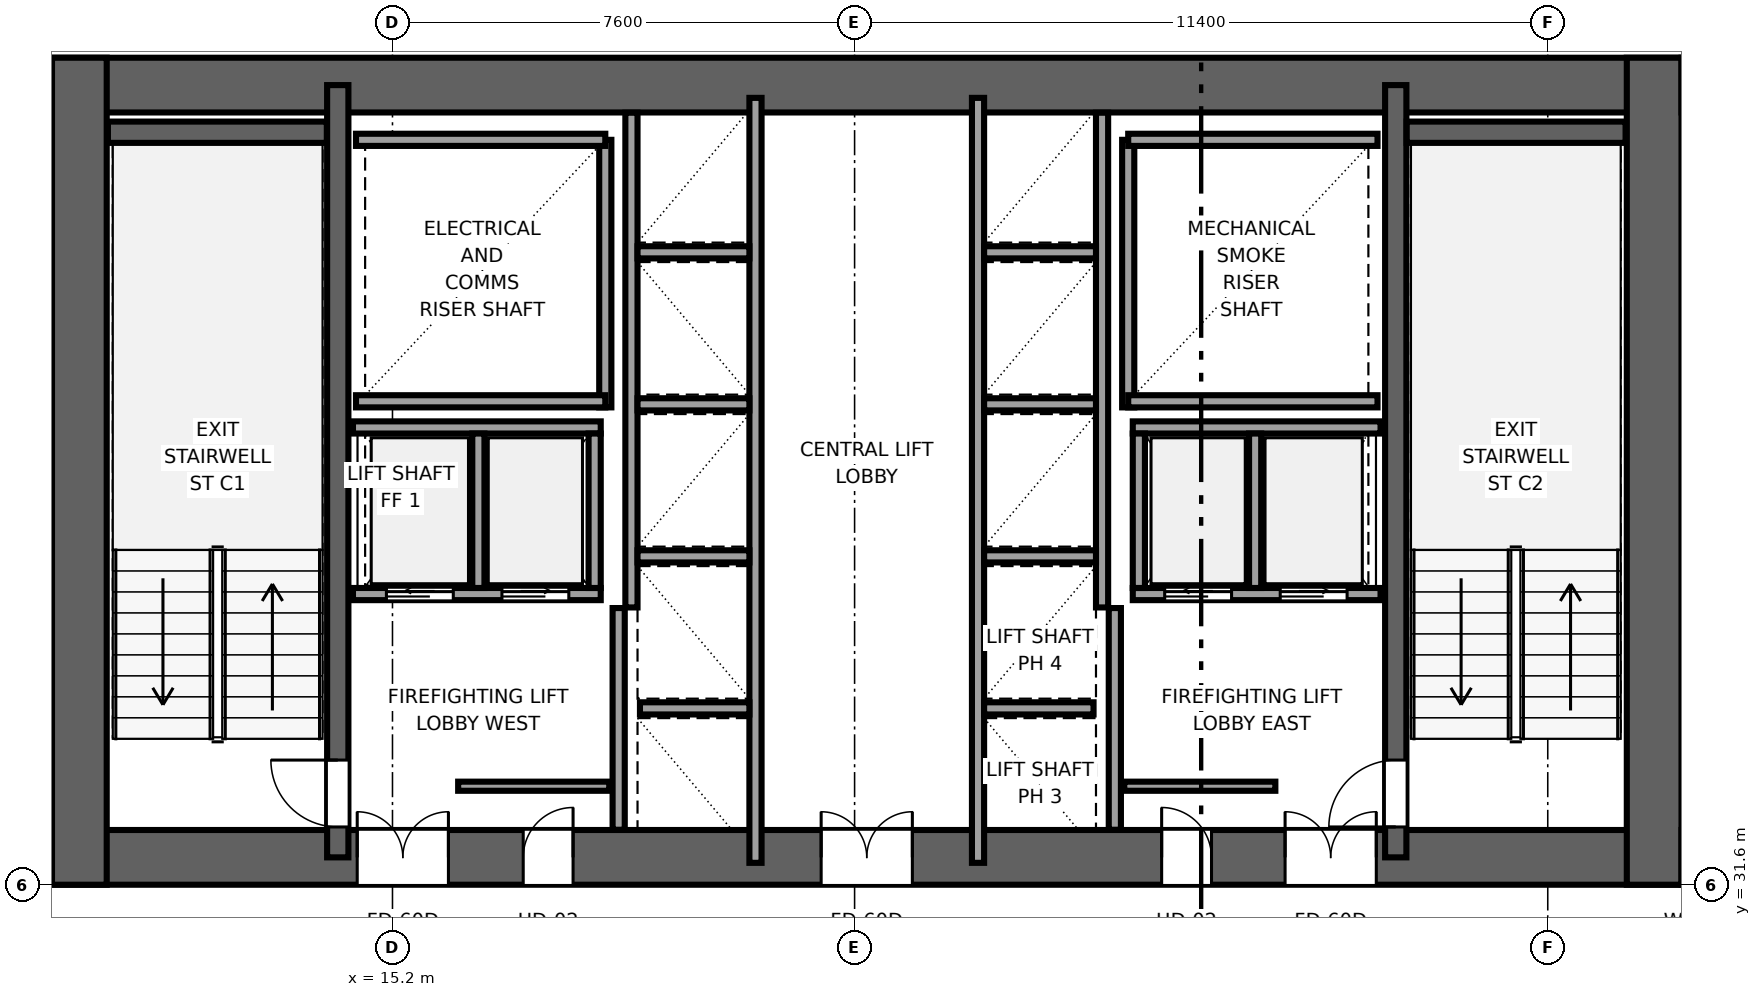
"""IFC4 building model, lengths in metres.
Left out: names, types, materials, properties, quantities, classifications, styles, units other than length and angle.
Written with IfcOpenShell. Run it as: python <this file> out.ifc"""

import sys

from ifc_helpers import new_model, si_unit, direction, frame, frame_2d, origin, place, context, subcontext, project, spatial, rectangle, extrude, source, transform, mapped, element, fill, save


model = new_model("IFC4")
c1 = context("Model", 3, precision=1e-05, world=origin(), true_north=direction((0.0, 1.0)))
c2 = subcontext(c1, "Body", "Model", "MODEL_VIEW")
j1 = project(units=[si_unit("LENGTHUNIT", "METRE"), si_unit("PLANEANGLEUNIT", "RADIAN")], contexts=[c1])
p1 = place(None, origin())
s1 = spatial("IfcSite", under=j1, at=p1, CompositionType="ELEMENT")
p2 = place(p1, origin())
s2 = spatial("IfcBuilding", under=s1, at=p2, CompositionType="ELEMENT")
p3 = place(p2, frame((0.0, 0.0, 81.7)))
s3 = spatial("IfcBuildingStorey", under=s2, at=p3, CompositionType="ELEMENT", Elevation=81.7)
p4 = place(p3, frame((9.6, 32.05, 0.0), z_axis=(0.0, 0.0, 1.0), x_axis=(1.0, 0.0, 0.0)))
e1 = element("IfcWall", 1, at=p4, inside=s3, PredefinedType="SHEAR", context=c2, shape_type="SweptSolid", body=[
    extrude(rectangle(XDim=26.8, YDim=0.9, at=frame_2d((13.4, 0.0))), origin(), (0.0, 0.0, 1.0), 3.55),
])
p5 = place(p4, frame((6.52, 0.0, 0.0), z_axis=(0.0, 0.0, 1.0), x_axis=(-1.0, 0.0, 0.0)))
e2 = element("IfcOpeningElement", 2, at=p5, cuts=e1, PredefinedType="OPENING", context=c2, shape_type="SweptSolid", body=[
    extrude(rectangle(XDim=1.5, YDim=2.04, at=frame_2d((0.75, 1.02))), frame((0.0, 0.46, 0.0), z_axis=(0.0, -1.0, 0.0), x_axis=(1.0, 0.0, 0.0)), (0.0, 0.0, 1.0), 0.92),
])
p6 = place(p4, frame((14.15, 0.0, 0.0), z_axis=(0.0, 0.0, 1.0), x_axis=(-1.0, 0.0, 0.0)))
e3 = element("IfcOpeningElement", 3, at=p6, cuts=e1, PredefinedType="OPENING", context=c2, shape_type="SweptSolid", body=[
    extrude(rectangle(XDim=1.5, YDim=2.04, at=frame_2d((0.75, 1.02))), frame((0.0, 0.46, 0.0), z_axis=(0.0, -1.0, 0.0), x_axis=(1.0, 0.0, 0.0)), (0.0, 0.0, 1.0), 0.92),
])
p7 = place(p4, frame((21.78, 0.0, 0.0), z_axis=(0.0, 0.0, 1.0), x_axis=(-1.0, 0.0, 0.0)))
e4 = element("IfcOpeningElement", 4, at=p7, cuts=e1, PredefinedType="OPENING", context=c2, shape_type="SweptSolid", body=[
    extrude(rectangle(XDim=1.5, YDim=2.04, at=frame_2d((0.75, 1.02))), frame((0.0, 0.46, 0.0), z_axis=(0.0, -1.0, 0.0), x_axis=(1.0, 0.0, 0.0)), (0.0, 0.0, 1.0), 0.92),
])
p8 = place(p4, frame((8.57, 0.0, 0.0), z_axis=(0.0, 0.0, 1.0), x_axis=(-1.0, 0.0, 0.0)))
e5 = element("IfcOpeningElement", 5, at=p8, cuts=e1, PredefinedType="OPENING", context=c2, shape_type="SweptSolid", body=[
    extrude(rectangle(XDim=0.82, YDim=2.01, at=frame_2d((0.41, 1.005))), frame((0.0, 0.46, 0.0), z_axis=(0.0, -1.0, 0.0), x_axis=(1.0, 0.0, 0.0)), (0.0, 0.0, 1.0), 0.92),
])
p9 = place(p4, frame((19.07, 0.0, 0.0), z_axis=(0.0, 0.0, 1.0), x_axis=(-1.0, 0.0, 0.0)))
e6 = element("IfcOpeningElement", 6, at=p9, cuts=e1, PredefinedType="OPENING", context=c2, shape_type="SweptSolid", body=[
    extrude(rectangle(XDim=0.82, YDim=2.01, at=frame_2d((0.41, 1.005))), frame((0.0, 0.46, 0.0), z_axis=(0.0, -1.0, 0.0), x_axis=(1.0, 0.0, 0.0)), (0.0, 0.0, 1.0), 0.92),
])
p10 = place(p3, frame((9.6, 44.75, 0.0), z_axis=(0.0, 0.0, 1.0), x_axis=(1.0, 0.0, 0.0)))
e7 = element("IfcWall", 7, at=p10, inside=s3, PredefinedType="SHEAR", context=c2, shape_type="SweptSolid", body=[
    extrude(rectangle(XDim=26.8, YDim=0.9, at=frame_2d((13.4, 0.0))), origin(), (0.0, 0.0, 1.0), 3.55),
])
for number, where, z_axis, x_axis in (
    (8, (10.05, 31.6, 0.0), (0.0, 0.0, 1.0), (0.0, 1.0, 0.0)),
    (9, (35.95, 31.6, 0.0), (0.0, 0.0, 1.0), (0.0, 1.0, 0.0)),
):
    element("IfcWall", number, at=place(p3, frame(where, z_axis=z_axis, x_axis=x_axis)), inside=s3, PredefinedType="SHEAR", context=c2, shape_type="SweptSolid", body=[
        extrude(rectangle(XDim=13.6, YDim=0.9, at=frame_2d((6.8, 0.0))), origin(), (0.0, 0.0, 1.0), 3.55),
    ])
p11 = place(p3, frame((14.3, 32.05, 0.0), z_axis=(0.0, 0.0, 1.0), x_axis=(0.0, 1.0, 0.0)))
e10 = element("IfcWall", 10, at=p11, inside=s3, PredefinedType="SHEAR", context=c2, shape_type="SweptSolid", body=[
    extrude(rectangle(XDim=12.7, YDim=0.35, at=frame_2d((6.35, 0.0))), origin(), (0.0, 0.0, 1.0), 3.55),
])
p12 = place(p11, frame((0.5, 0.0, 0.0)))
e11 = element("IfcOpeningElement", 11, at=p12, cuts=e10, PredefinedType="OPENING", context=c2, shape_type="SweptSolid", body=[
    extrude(rectangle(XDim=1.1, YDim=2.12, at=frame_2d((0.55, 1.06))), frame((0.0, 0.185, 0.0), z_axis=(0.0, -1.0, 0.0), x_axis=(1.0, 0.0, 0.0)), (0.0, 0.0, 1.0), 0.37),
])
p13 = place(p3, frame((31.7, 32.05, 0.0), z_axis=(0.0, 0.0, 1.0), x_axis=(0.0, 1.0, 0.0)))
e12 = element("IfcWall", 12, at=p13, inside=s3, PredefinedType="SHEAR", context=c2, shape_type="SweptSolid", body=[
    extrude(rectangle(XDim=12.7, YDim=0.35, at=frame_2d((6.35, 0.0))), origin(), (0.0, 0.0, 1.0), 3.55),
])
p14 = place(p13, frame((1.6, 0.0, 0.0), z_axis=(0.0, 0.0, 1.0), x_axis=(-1.0, 0.0, 0.0)))
e13 = element("IfcOpeningElement", 13, at=p14, cuts=e12, PredefinedType="OPENING", context=c2, shape_type="SweptSolid", body=[
    extrude(rectangle(XDim=1.1, YDim=2.12, at=frame_2d((0.55, 1.06))), frame((0.0, 0.185, 0.0), z_axis=(0.0, -1.0, 0.0), x_axis=(1.0, 0.0, 0.0)), (0.0, 0.0, 1.0), 0.37),
])
for number, where, z_axis, x_axis in (
    (14, (10.52, 43.975, 0.0), (0.0, 0.0, 1.0), (1.0, 0.0, 0.0)),
    (15, (31.88, 43.975, 0.0), (0.0, 0.0, 1.0), (1.0, 0.0, 0.0)),
):
    element("IfcWall", number, at=place(p3, frame(where, z_axis=z_axis, x_axis=x_axis)), inside=s3, PredefinedType="SHEAR", context=c2, shape_type="SweptSolid", body=[
        extrude(rectangle(XDim=3.6, YDim=0.35, at=frame_2d((1.8, 0.0))), origin(), (0.0, 0.0, 1.0), 3.55),
    ])
p15 = place(p3, frame((18.7, 39.45, 0.0), z_axis=(0.0, 0.0, 1.0), x_axis=(0.0, 1.0, 0.0)))
e16 = element("IfcWall", 16, at=p15, inside=s3, PredefinedType="SOLIDWALL", context=c2, shape_type="SweptSolid", body=[
    extrude(rectangle(XDim=4.4, YDim=0.2, at=frame_2d((2.2, 0.0))), origin(), (0.0, 0.0, 1.0), 3.37),
])
for number, where, z_axis, x_axis in (
    (17, (14.6, 39.55, 0.0), (0.0, 0.0, 1.0), (1.0, 0.0, 0.0)),
    (18, (14.6, 43.85, 0.0), (0.0, 0.0, 1.0), (1.0, 0.0, 0.0)),
):
    element("IfcWall", number, at=place(p3, frame(where, z_axis=z_axis, x_axis=x_axis)), inside=s3, PredefinedType="SOLIDWALL", context=c2, shape_type="SweptSolid", body=[
        extrude(rectangle(XDim=4.1, YDim=0.2, at=frame_2d((2.05, 0.0))), origin(), (0.0, 0.0, 1.0), 3.37),
    ])
p16 = place(p3, frame((27.3, 39.45, 0.0), z_axis=(0.0, 0.0, 1.0), x_axis=(0.0, 1.0, 0.0)))
e19 = element("IfcWall", 19, at=p16, inside=s3, PredefinedType="SOLIDWALL", context=c2, shape_type="SweptSolid", body=[
    extrude(rectangle(XDim=4.4, YDim=0.2, at=frame_2d((2.2, 0.0))), origin(), (0.0, 0.0, 1.0), 3.37),
])
for number, where, z_axis, x_axis in (
    (20, (27.3, 39.55, 0.0), (0.0, 0.0, 1.0), (1.0, 0.0, 0.0)),
    (21, (27.3, 43.85, 0.0), (0.0, 0.0, 1.0), (1.0, 0.0, 0.0)),
):
    element("IfcWall", number, at=place(p3, frame(where, z_axis=z_axis, x_axis=x_axis)), inside=s3, PredefinedType="SOLIDWALL", context=c2, shape_type="SweptSolid", body=[
        extrude(rectangle(XDim=4.1, YDim=0.2, at=frame_2d((2.05, 0.0))), origin(), (0.0, 0.0, 1.0), 3.37),
    ])
for number, where, z_axis, x_axis in (
    (22, (18.92, 32.504, 0.0), (0.0, 0.0, 1.0), (0.0, 1.0, 0.0)),
    (23, (27.08, 32.504, 0.0), (0.0, 0.0, 1.0), (0.0, 1.0, 0.0)),
):
    element("IfcWall", number, at=place(p3, frame(where, z_axis=z_axis, x_axis=x_axis)), inside=s3, PredefinedType="SOLIDWALL", context=c2, shape_type="SweptSolid", body=[
        extrude(rectangle(XDim=3.646, YDim=0.2, at=frame_2d((1.823, 0.0))), origin(), (0.0, 0.0, 1.0), 3.37),
    ])
p17 = place(p3, frame((21.17, 31.96, 0.0), z_axis=(0.0, 0.0, 1.0), x_axis=(0.0, 1.0, 0.0)))
e24 = element("IfcWall", 24, at=p17, inside=s3, PredefinedType="SOLIDWALL", context=c2, shape_type="SweptSolid", body=[
    extrude(rectangle(XDim=12.58, YDim=0.2, at=frame_2d((6.29, 0.0))), origin(), (0.0, 0.0, 1.0), 3.37),
])
p18 = place(p3, frame((19.13, 36.16, 0.0), z_axis=(0.0, 0.0, 1.0), x_axis=(0.0, 1.0, 0.0)))
e25 = element("IfcWall", 25, at=p18, inside=s3, PredefinedType="SOLIDWALL", context=c2, shape_type="SweptSolid", body=[
    extrude(rectangle(XDim=8.136, YDim=0.2, at=frame_2d((4.068, 0.0))), origin(), (0.0, 0.0, 1.0), 3.37),
])
p19 = place(p3, frame((19.27, 34.5, 0.0), z_axis=(0.0, 0.0, 1.0), x_axis=(1.0, 0.0, 0.0)))
e26 = element("IfcWall", 26, at=p19, inside=s3, PredefinedType="SOLIDWALL", context=c2, shape_type="SweptSolid", body=[
    extrude(rectangle(XDim=1.8, YDim=0.2, at=frame_2d((0.9, 0.0))), origin(), (0.0, 0.0, 1.0), 3.37),
])
for number, where, z_axis, x_axis in (
    (27, (19.23, 37.0, 0.0), (0.0, 0.0, 1.0), (1.0, 0.0, 0.0)),
    (28, (19.23, 39.5, 0.0), (0.0, 0.0, 1.0), (1.0, 0.0, 0.0)),
    (29, (19.23, 42.0, 0.0), (0.0, 0.0, 1.0), (1.0, 0.0, 0.0)),
):
    element("IfcWall", number, at=place(p3, frame(where, z_axis=z_axis, x_axis=x_axis)), inside=s3, PredefinedType="SOLIDWALL", context=c2, shape_type="SweptSolid", body=[
        extrude(rectangle(XDim=1.84, YDim=0.2, at=frame_2d((0.92, 0.0))), origin(), (0.0, 0.0, 1.0), 3.37),
    ])
p20 = place(p3, frame((27.375, 36.38, 0.0), z_axis=(0.0, 0.0, 1.0), x_axis=(1.0, 0.0, 0.0)))
e30 = element("IfcWall", 30, at=p20, inside=s3, PredefinedType="SOLIDWALL", context=c2, shape_type="SweptSolid", body=[
    extrude(rectangle(XDim=4.075, YDim=0.2, at=frame_2d((2.038, 0.0))), origin(), (0.0, 0.0, 1.0), 3.37),
])
p21 = place(p20, frame((0.525, 0.0, 0.0)))
e31 = element("IfcOpeningElement", 31, at=p21, cuts=e30, PredefinedType="OPENING", context=c2, shape_type="SweptSolid", body=[
    extrude(rectangle(XDim=1.1, YDim=2.12, at=frame_2d((0.55, 1.06))), frame((0.0, 0.11, 0.0), z_axis=(0.0, -1.0, 0.0), x_axis=(1.0, 0.0, 0.0)), (0.0, 0.0, 1.0), 0.22),
])
p22 = place(p20, frame((2.425, 0.0, 0.0)))
e32 = element("IfcOpeningElement", 32, at=p22, cuts=e30, PredefinedType="OPENING", context=c2, shape_type="SweptSolid", body=[
    extrude(rectangle(XDim=1.1, YDim=2.12, at=frame_2d((0.55, 1.06))), frame((0.0, 0.11, 0.0), z_axis=(0.0, -1.0, 0.0), x_axis=(1.0, 0.0, 0.0)), (0.0, 0.0, 1.0), 0.22),
])
p23 = place(p3, frame((27.375, 39.12, 0.0), z_axis=(0.0, 0.0, 1.0), x_axis=(1.0, 0.0, 0.0)))
e33 = element("IfcWall", 33, at=p23, inside=s3, PredefinedType="SOLIDWALL", context=c2, shape_type="SweptSolid", body=[
    extrude(rectangle(XDim=4.075, YDim=0.2, at=frame_2d((2.038, 0.0))), origin(), (0.0, 0.0, 1.0), 3.37),
])
for number, where, z_axis, x_axis in (
    (34, (27.475, 36.48, 0.0), (0.0, 0.0, 1.0), (0.0, 1.0, 0.0)),
    (35, (29.387, 36.48, 0.0), (0.0, 0.0, 1.0), (0.0, 1.0, 0.0)),
):
    element("IfcWall", number, at=place(p3, frame(where, z_axis=z_axis, x_axis=x_axis)), inside=s3, PredefinedType="SOLIDWALL", context=c2, shape_type="SweptSolid", body=[
        extrude(rectangle(XDim=2.54, YDim=0.2, at=frame_2d((1.27, 0.0))), origin(), (0.0, 0.0, 1.0), 3.37),
    ])
p24 = place(p3, frame((14.55, 36.38, 0.0), z_axis=(0.0, 0.0, 1.0), x_axis=(1.0, 0.0, 0.0)))
e36 = element("IfcWall", 36, at=p24, inside=s3, PredefinedType="SOLIDWALL", context=c2, shape_type="SweptSolid", body=[
    extrude(rectangle(XDim=4.075, YDim=0.2, at=frame_2d((2.038, 0.0))), origin(), (0.0, 0.0, 1.0), 3.37),
])
p25 = place(p24, frame((0.55, 0.0, 0.0)))
e37 = element("IfcOpeningElement", 37, at=p25, cuts=e36, PredefinedType="OPENING", context=c2, shape_type="SweptSolid", body=[
    extrude(rectangle(XDim=1.1, YDim=2.12, at=frame_2d((0.55, 1.06))), frame((0.0, 0.11, 0.0), z_axis=(0.0, -1.0, 0.0), x_axis=(1.0, 0.0, 0.0)), (0.0, 0.0, 1.0), 0.22),
])
p26 = place(p24, frame((2.45, 0.0, 0.0)))
e38 = element("IfcOpeningElement", 38, at=p26, cuts=e36, PredefinedType="OPENING", context=c2, shape_type="SweptSolid", body=[
    extrude(rectangle(XDim=1.1, YDim=2.12, at=frame_2d((0.55, 1.06))), frame((0.0, 0.11, 0.0), z_axis=(0.0, -1.0, 0.0), x_axis=(1.0, 0.0, 0.0)), (0.0, 0.0, 1.0), 0.22),
])
p27 = place(p3, frame((14.55, 39.12, 0.0), z_axis=(0.0, 0.0, 1.0), x_axis=(1.0, 0.0, 0.0)))
e39 = element("IfcWall", 39, at=p27, inside=s3, PredefinedType="SOLIDWALL", context=c2, shape_type="SweptSolid", body=[
    extrude(rectangle(XDim=4.075, YDim=0.2, at=frame_2d((2.038, 0.0))), origin(), (0.0, 0.0, 1.0), 3.37),
])
for number, where, z_axis, x_axis in (
    (40, (18.525, 36.48, 0.0), (0.0, 0.0, 1.0), (0.0, 1.0, 0.0)),
    (41, (16.613, 36.48, 0.0), (0.0, 0.0, 1.0), (0.0, 1.0, 0.0)),
):
    element("IfcWall", number, at=place(p3, frame(where, z_axis=z_axis, x_axis=x_axis)), inside=s3, PredefinedType="SOLIDWALL", context=c2, shape_type="SweptSolid", body=[
        extrude(rectangle(XDim=2.54, YDim=0.2, at=frame_2d((1.27, 0.0))), origin(), (0.0, 0.0, 1.0), 3.37),
    ])
p28 = place(p3, frame((24.83, 31.96, 0.0), z_axis=(0.0, 0.0, 1.0), x_axis=(0.0, 1.0, 0.0)))
e42 = element("IfcWall", 42, at=p28, inside=s3, PredefinedType="SOLIDWALL", context=c2, shape_type="SweptSolid", body=[
    extrude(rectangle(XDim=12.58, YDim=0.2, at=frame_2d((6.29, 0.0))), origin(), (0.0, 0.0, 1.0), 3.37),
])
p29 = place(p3, frame((26.87, 36.16, 0.0), z_axis=(0.0, 0.0, 1.0), x_axis=(0.0, 1.0, 0.0)))
e43 = element("IfcWall", 43, at=p29, inside=s3, PredefinedType="SOLIDWALL", context=c2, shape_type="SweptSolid", body=[
    extrude(rectangle(XDim=8.136, YDim=0.2, at=frame_2d((4.068, 0.0))), origin(), (0.0, 0.0, 1.0), 3.37),
])
p30 = place(p3, frame((24.93, 34.5, 0.0), z_axis=(0.0, 0.0, 1.0), x_axis=(1.0, 0.0, 0.0)))
e44 = element("IfcWall", 44, at=p30, inside=s3, PredefinedType="SOLIDWALL", context=c2, shape_type="SweptSolid", body=[
    extrude(rectangle(XDim=1.8, YDim=0.2, at=frame_2d((0.9, 0.0))), origin(), (0.0, 0.0, 1.0), 3.37),
])
for number, where, z_axis, x_axis in (
    (45, (24.93, 37.0, 0.0), (0.0, 0.0, 1.0), (1.0, 0.0, 0.0)),
    (46, (24.93, 39.5, 0.0), (0.0, 0.0, 1.0), (1.0, 0.0, 0.0)),
    (47, (24.93, 42.0, 0.0), (0.0, 0.0, 1.0), (1.0, 0.0, 0.0)),
):
    element("IfcWall", number, at=place(p3, frame(where, z_axis=z_axis, x_axis=x_axis)), inside=s3, PredefinedType="SOLIDWALL", context=c2, shape_type="SweptSolid", body=[
        extrude(rectangle(XDim=1.84, YDim=0.2, at=frame_2d((0.92, 0.0))), origin(), (0.0, 0.0, 1.0), 3.37),
    ])
for number, where, z_axis, x_axis in (
    (48, (16.28, 33.22, 0.0), (0.0, 0.0, 1.0), (1.0, 0.0, 0.0)),
    (49, (27.235, 33.22, 0.0), (0.0, 0.0, 1.0), (1.0, 0.0, 0.0)),
):
    element("IfcWall", number, at=place(p3, frame(where, z_axis=z_axis, x_axis=x_axis)), inside=s3, PredefinedType="PARTITIONING", context=c2, shape_type="SweptSolid", body=[
        extrude(rectangle(XDim=2.485, YDim=0.15, at=frame_2d((1.242, 0.0))), origin(), (0.0, 0.0, 1.0), 3.37),
    ])
m1 = source(origin(), c2, "Body", "SweptSolid", [
    extrude(rectangle(XDim=1.1, YDim=2.12, at=frame_2d((0.55, 1.06))), frame((0.0, 0.025, 0.0), z_axis=(0.0, -1.0, 0.0), x_axis=(1.0, 0.0, 0.0)), (0.0, 0.0, 1.0), 0.05),
])
p31 = place(p12, origin())
e50 = element("IfcDoor", 50, at=p31, inside=s3, OperationType="SINGLE_SWING_RIGHT", PredefinedType="DOOR", context=c2, shape_type="MappedRepresentation", body=[
    mapped(m1, transform((0.0, 0.0, 0.0), x_axis=(1.0, 0.0, 0.0), y_axis=(0.0, 1.0, 0.0), z_axis=(0.0, 0.0, 1.0), scale=1.0)),
])
fill(e11, e50)
p32 = place(p14, origin())
e51 = element("IfcDoor", 51, at=p32, inside=s3, OperationType="SINGLE_SWING_LEFT", PredefinedType="DOOR", context=c2, shape_type="MappedRepresentation", body=[
    mapped(m1, transform((0.0, 0.0, 0.0), x_axis=(1.0, 0.0, 0.0), y_axis=(0.0, 1.0, 0.0), z_axis=(0.0, 0.0, 1.0), scale=1.0)),
])
fill(e13, e51)
m2 = source(origin(), c2, "Body", "SweptSolid", [
    extrude(rectangle(XDim=1.5, YDim=2.04, at=frame_2d((0.75, 1.02))), frame((0.0, 0.025, 0.0), z_axis=(0.0, -1.0, 0.0), x_axis=(1.0, 0.0, 0.0)), (0.0, 0.0, 1.0), 0.05),
])
p33 = place(p5, origin())
e52 = element("IfcDoor", 52, at=p33, inside=s3, OperationType="DOUBLE_DOOR_SINGLE_SWING", PredefinedType="DOOR", context=c2, shape_type="MappedRepresentation", body=[
    mapped(m2, transform((0.0, 0.0, 0.0), x_axis=(1.0, 0.0, 0.0), y_axis=(0.0, 1.0, 0.0), z_axis=(0.0, 0.0, 1.0), scale=1.0)),
])
fill(e2, e52)
p34 = place(p6, origin())
e53 = element("IfcDoor", 53, at=p34, inside=s3, OperationType="DOUBLE_DOOR_SINGLE_SWING", PredefinedType="DOOR", context=c2, shape_type="MappedRepresentation", body=[
    mapped(m2, transform((0.0, 0.0, 0.0), x_axis=(1.0, 0.0, 0.0), y_axis=(0.0, 1.0, 0.0), z_axis=(0.0, 0.0, 1.0), scale=1.0)),
])
fill(e3, e53)
p35 = place(p7, origin())
e54 = element("IfcDoor", 54, at=p35, inside=s3, OperationType="DOUBLE_DOOR_SINGLE_SWING", PredefinedType="DOOR", context=c2, shape_type="MappedRepresentation", body=[
    mapped(m2, transform((0.0, 0.0, 0.0), x_axis=(1.0, 0.0, 0.0), y_axis=(0.0, 1.0, 0.0), z_axis=(0.0, 0.0, 1.0), scale=1.0)),
])
fill(e4, e54)
m3 = source(origin(), c2, "Body", "SweptSolid", [
    extrude(rectangle(XDim=0.82, YDim=2.01, at=frame_2d((0.41, 1.005))), frame((0.0, 0.025, 0.0), z_axis=(0.0, -1.0, 0.0), x_axis=(1.0, 0.0, 0.0)), (0.0, 0.0, 1.0), 0.05),
])
p36 = place(p8, origin())
e55 = element("IfcDoor", 55, at=p36, inside=s3, OperationType="SINGLE_SWING_RIGHT", PredefinedType="DOOR", context=c2, shape_type="MappedRepresentation", body=[
    mapped(m3, transform((0.0, 0.0, 0.0), x_axis=(1.0, 0.0, 0.0), y_axis=(0.0, 1.0, 0.0), z_axis=(0.0, 0.0, 1.0), scale=1.0)),
])
fill(e5, e55)
p37 = place(p9, origin())
e56 = element("IfcDoor", 56, at=p37, inside=s3, OperationType="SINGLE_SWING_LEFT", PredefinedType="DOOR", context=c2, shape_type="MappedRepresentation", body=[
    mapped(m3, transform((0.0, 0.0, 0.0), x_axis=(1.0, 0.0, 0.0), y_axis=(0.0, 1.0, 0.0), z_axis=(0.0, 0.0, 1.0), scale=1.0)),
])
fill(e6, e56)
m4 = source(origin(), c2, "Body", "SweptSolid", [
    extrude(rectangle(XDim=1.1, YDim=2.12, at=frame_2d((0.55, 1.06))), frame((0.0, 0.025, 0.0), z_axis=(0.0, -1.0, 0.0), x_axis=(1.0, 0.0, 0.0)), (0.0, 0.0, 1.0), 0.05),
])
p38 = place(p21, origin())
e57 = element("IfcDoor", 57, at=p38, inside=s3, OperationType="SLIDING_TO_LEFT", PredefinedType="DOOR", context=c2, shape_type="MappedRepresentation", body=[
    mapped(m4, transform((0.0, 0.0, 0.0), x_axis=(1.0, 0.0, 0.0), y_axis=(0.0, 1.0, 0.0), z_axis=(0.0, 0.0, 1.0), scale=1.0)),
])
fill(e31, e57)
p39 = place(p22, origin())
e58 = element("IfcDoor", 58, at=p39, inside=s3, OperationType="SLIDING_TO_RIGHT", PredefinedType="DOOR", context=c2, shape_type="MappedRepresentation", body=[
    mapped(m4, transform((0.0, 0.0, 0.0), x_axis=(1.0, 0.0, 0.0), y_axis=(0.0, 1.0, 0.0), z_axis=(0.0, 0.0, 1.0), scale=1.0)),
])
fill(e32, e58)
p40 = place(p25, origin())
e59 = element("IfcDoor", 59, at=p40, inside=s3, OperationType="SLIDING_TO_LEFT", PredefinedType="DOOR", context=c2, shape_type="MappedRepresentation", body=[
    mapped(m4, transform((0.0, 0.0, 0.0), x_axis=(1.0, 0.0, 0.0), y_axis=(0.0, 1.0, 0.0), z_axis=(0.0, 0.0, 1.0), scale=1.0)),
])
fill(e37, e59)
p41 = place(p26, origin())
e60 = element("IfcDoor", 60, at=p41, inside=s3, OperationType="SLIDING_TO_RIGHT", PredefinedType="DOOR", context=c2, shape_type="MappedRepresentation", body=[
    mapped(m4, transform((0.0, 0.0, 0.0), x_axis=(1.0, 0.0, 0.0), y_axis=(0.0, 1.0, 0.0), z_axis=(0.0, 0.0, 1.0), scale=1.0)),
])
fill(e38, e60)
save(model, sys.argv[1])
